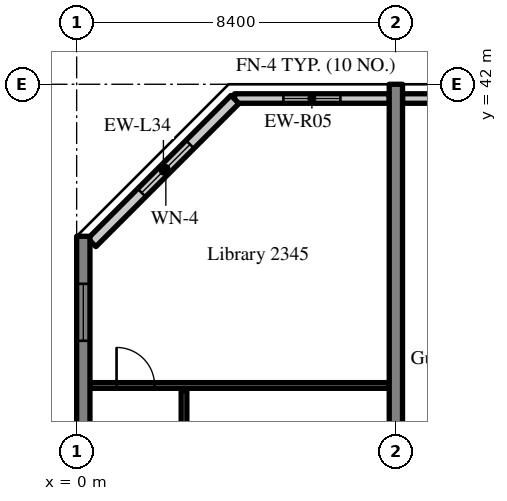
"""IFC4 building model, lengths in metres.
Left out: names, types, materials, properties, quantities, classifications, styles, units other than length and angle.
Written with IfcOpenShell. Run it as: python <this file> out.ifc"""

import sys

from ifc_helpers import new_model, si_unit, direction, frame, frame_2d, origin, place, context, subcontext, project, spatial, rectangle, extrude, source, transform, mapped, element, fill, save


model = new_model("IFC4")
c1 = context("Model", 3, precision=1e-05, world=origin(), true_north=direction((0.0, 1.0)))
c2 = subcontext(c1, "Body", "Model", "MODEL_VIEW")
j1 = project(units=[si_unit("LENGTHUNIT", "METRE"), si_unit("PLANEANGLEUNIT", "RADIAN")], contexts=[c1])
p1 = place(None, origin())
s1 = spatial("IfcSite", under=j1, at=p1, CompositionType="ELEMENT")
p2 = place(p1, origin())
s2 = spatial("IfcBuilding", under=s1, at=p2, CompositionType="ELEMENT")
p3 = place(p2, frame((0.0, 0.0, 99.0)))
s3 = spatial("IfcBuildingStorey", under=s2, at=p3, CompositionType="ELEMENT", Elevation=99.0)
m1 = source(origin(), c2, "Body", "SweptSolid", [
    extrude(rectangle(XDim=16.0, YDim=0.35, at=frame_2d((8.0, 0.0))), origin(), (0.0, 0.0, 1.0), 3.52),
])
p4 = place(p3, frame((0.175, 22.0, 0.0), z_axis=(0.0, 0.0, 1.0), x_axis=(0.0, 1.0, 0.0)))
e1 = element("IfcWall", 1, at=p4, inside=s3, PredefinedType="SHEAR", context=c2, shape_type="MappedRepresentation", body=[
    mapped(m1, transform((0.0, 0.0, 0.0), scale=1.0)),
])
m2 = source(origin(), c2, "Body", "SweptSolid", [
    extrude(rectangle(XDim=1.5, YDim=1.5, at=frame_2d((0.75, 0.75))), frame((0.0, 0.185, 0.0), z_axis=(0.0, -1.0, 0.0), x_axis=(1.0, 0.0, 0.0)), (0.0, 0.0, 1.0), 0.37),
])
p5 = place(p4, frame((1.25, 0.0, 0.9)))
e2 = element("IfcOpeningElement", 2, at=p5, cuts=e1, PredefinedType="OPENING", context=c2, shape_type="MappedRepresentation", body=[
    mapped(m2, transform((0.0, 0.0, 0.0), scale=1.0)),
])
p6 = place(p4, frame((5.25, 0.0, 0.9)))
e3 = element("IfcOpeningElement", 3, at=p6, cuts=e1, PredefinedType="OPENING", context=c2, shape_type="MappedRepresentation", body=[
    mapped(m2, transform((0.0, 0.0, 0.0), scale=1.0)),
])
p7 = place(p4, frame((9.25, 0.0, 0.9)))
e4 = element("IfcOpeningElement", 4, at=p7, cuts=e1, PredefinedType="OPENING", context=c2, shape_type="MappedRepresentation", body=[
    mapped(m2, transform((0.0, 0.0, 0.0), scale=1.0)),
])
p8 = place(p4, frame((13.25, 0.0, 0.9)))
e5 = element("IfcOpeningElement", 5, at=p8, cuts=e1, PredefinedType="OPENING", context=c2, shape_type="MappedRepresentation", body=[
    mapped(m2, transform((0.0, 0.0, 0.0), scale=1.0)),
])
m3 = source(origin(), c2, "Body", "SweptSolid", [
    extrude(rectangle(XDim=20.0, YDim=0.35, at=frame_2d((10.0, 0.0))), origin(), (0.0, 0.0, 1.0), 3.52),
])
p9 = place(p3, frame((8.4, 22.0, 0.0), z_axis=(0.0, 0.0, 1.0), x_axis=(0.0, 1.0, 0.0)))
e6 = element("IfcWall", 6, at=p9, inside=s3, PredefinedType="SHEAR", context=c2, shape_type="MappedRepresentation", body=[
    mapped(m3, transform((0.0, 0.0, 0.0), scale=1.0)),
])
m4 = source(origin(), c2, "Body", "SweptSolid", [
    extrude(rectangle(XDim=4.07, YDim=0.25, at=frame_2d((2.035, 0.0))), origin(), (0.0, 0.0, 1.0), 2.82),
])
p10 = place(p3, frame((8.225, 41.625, 0.0), z_axis=(0.0, 0.0, 1.0), x_axis=(-1.0, 0.0, 0.0)))
e7 = element("IfcWall", 7, at=p10, inside=s3, PredefinedType="SOLIDWALL", context=c2, shape_type="MappedRepresentation", body=[
    mapped(m4, transform((0.0, 0.0, 0.0), scale=1.0)),
])
m5 = source(origin(), c2, "Body", "SweptSolid", [
    extrude(rectangle(XDim=1.5, YDim=1.5, at=frame_2d((0.75, 0.75))), frame((0.0, 0.135, 0.0), z_axis=(0.0, -1.0, 0.0), x_axis=(1.0, 0.0, 0.0)), (0.0, 0.0, 1.0), 0.27),
])
p11 = place(p10, frame((1.285, 0.0, 0.9)))
e8 = element("IfcOpeningElement", 8, at=p11, cuts=e7, PredefinedType="OPENING", context=c2, shape_type="MappedRepresentation", body=[
    mapped(m5, transform((0.0, 0.0, 0.0), scale=1.0)),
])
m6 = source(origin(), c2, "Body", "SweptSolid", [
    extrude(rectangle(XDim=3.675, YDim=0.25, at=frame_2d((1.837, 0.0))), origin(), (0.0, 0.0, 1.0), 2.82),
])
p12 = place(p3, frame((12.25, 41.625, 0.0), z_axis=(0.0, 0.0, 1.0), x_axis=(-1.0, 0.0, 0.0)))
e9 = element("IfcWall", 9, at=p12, inside=s3, PredefinedType="SOLIDWALL", context=c2, shape_type="MappedRepresentation", body=[
    mapped(m6, transform((0.0, 0.0, 0.0), scale=1.0)),
])
p13 = place(p12, frame((1.087, 0.0, 0.9)))
e10 = element("IfcOpeningElement", 10, at=p13, cuts=e9, PredefinedType="OPENING", context=c2, shape_type="MappedRepresentation", body=[
    mapped(m5, transform((0.0, 0.0, 0.0), scale=1.0)),
])
m7 = source(origin(), c2, "Body", "SweptSolid", [
    extrude(rectangle(XDim=5.326, YDim=0.3, at=frame_2d((2.663, 0.0))), origin(), (0.0, 0.0, 1.0), 3.52),
])
p14 = place(p3, frame((4.166, 41.6, 0.0), z_axis=(0.0, 0.0, 1.0), x_axis=(-0.707106781187, -0.707106781187, 0.0)))
e11 = element("IfcWall", 11, at=p14, inside=s3, PredefinedType="SOLIDWALL", context=c2, shape_type="MappedRepresentation", body=[
    mapped(m7, transform((0.0, 0.0, 0.0), scale=1.0)),
])
m8 = source(origin(), c2, "Body", "SweptSolid", [
    extrude(rectangle(XDim=1.8, YDim=1.5, at=frame_2d((0.9, 0.75))), frame((0.0, 0.16, 0.0), z_axis=(0.0, -1.0, 0.0), x_axis=(1.0, 0.0, 0.0)), (0.0, 0.0, 1.0), 0.32),
])
p15 = place(p14, frame((1.672, 0.0, 0.9)))
e12 = element("IfcOpeningElement", 12, at=p15, cuts=e11, PredefinedType="OPENING", context=c2, shape_type="MappedRepresentation", body=[
    mapped(m8, transform((0.0, 0.0, 0.0), scale=1.0)),
])
m9 = source(origin(), c2, "Body", "SweptSolid", [
    extrude(rectangle(XDim=4.45, YDim=0.15, at=frame_2d((2.225, 0.0))), origin(), (0.0, 0.0, 1.0), 3.52),
])
p16 = place(p3, frame((2.825, 29.475, 0.0), z_axis=(0.0, 0.0, 1.0), x_axis=(0.0, 1.0, 0.0)))
e13 = element("IfcWall", 13, at=p16, inside=s3, PredefinedType="PARTITIONING", context=c2, shape_type="MappedRepresentation", body=[
    mapped(m9, transform((0.0, 0.0, 0.0), scale=1.0)),
])
m10 = source(origin(), c2, "Body", "SweptSolid", [
    extrude(rectangle(XDim=1.0, YDim=2.1, at=frame_2d((0.5, 1.05))), frame((0.0, 0.085, 0.0), z_axis=(0.0, -1.0, 0.0), x_axis=(1.0, 0.0, 0.0)), (0.0, 0.0, 1.0), 0.17),
])
p17 = place(p16, frame((1.725, 0.0, 0.0)))
e14 = element("IfcOpeningElement", 14, at=p17, cuts=e13, PredefinedType="OPENING", context=c2, shape_type="MappedRepresentation", body=[
    mapped(m10, transform((0.0, 0.0, 0.0), scale=1.0)),
])
m11 = source(origin(), c2, "Body", "SweptSolid", [
    extrude(rectangle(XDim=7.875, YDim=0.15, at=frame_2d((3.938, 0.0))), origin(), (0.0, 0.0, 1.0), 3.52),
])
p18 = place(p3, frame((0.35, 34.075, 0.0), z_axis=(0.0, 0.0, 1.0), x_axis=(1.0, 0.0, 0.0)))
e15 = element("IfcWall", 15, at=p18, inside=s3, PredefinedType="PARTITIONING", context=c2, shape_type="MappedRepresentation", body=[
    mapped(m11, transform((0.0, 0.0, 0.0), scale=1.0)),
])
p19 = place(p18, frame((0.7, 0.0, 0.0)))
e16 = element("IfcOpeningElement", 16, at=p19, cuts=e15, PredefinedType="OPENING", context=c2, shape_type="MappedRepresentation", body=[
    mapped(m10, transform((0.0, 0.0, 0.0), scale=1.0)),
])
m12 = source(origin(), c2, "Body", "SweptSolid", [
    extrude(rectangle(XDim=1.5, YDim=1.5, at=frame_2d((0.75, 0.75))), frame((0.0, 0.03, 0.0), z_axis=(0.0, -1.0, 0.0), x_axis=(1.0, 0.0, 0.0)), (0.0, 0.0, 1.0), 0.06),
])
p20 = place(p11, origin())
e17 = element("IfcWindow", 17, at=p20, inside=s3, PartitioningType="SINGLE_PANEL", PredefinedType="WINDOW", context=c2, shape_type="MappedRepresentation", body=[
    mapped(m12, transform((0.0, 0.0, 0.0), scale=1.0)),
])
fill(e8, e17)
m13 = source(origin(), c2, "Body", "SweptSolid", [
    extrude(rectangle(XDim=1.8, YDim=1.5, at=frame_2d((0.9, 0.75))), frame((0.0, 0.03, 0.0), z_axis=(0.0, -1.0, 0.0), x_axis=(1.0, 0.0, 0.0)), (0.0, 0.0, 1.0), 0.06),
])
p21 = place(p15, origin())
e18 = element("IfcWindow", 18, at=p21, inside=s3, PartitioningType="SINGLE_PANEL", PredefinedType="WINDOW", context=c2, shape_type="MappedRepresentation", body=[
    mapped(m13, transform((0.0, 0.0, 0.0), scale=1.0)),
])
fill(e12, e18)
p22 = place(p8, origin())
e19 = element("IfcWindow", 19, at=p22, inside=s3, PartitioningType="SINGLE_PANEL", PredefinedType="WINDOW", context=c2, shape_type="MappedRepresentation", body=[
    mapped(m12, transform((0.0, 0.0, 0.0), scale=1.0)),
])
fill(e5, e19)
m14 = source(origin(), c2, "Body", "SweptSolid", [
    extrude(rectangle(XDim=1.0, YDim=2.1, at=frame_2d((0.5, 1.05))), frame((0.0, 0.025, 0.0), z_axis=(0.0, -1.0, 0.0), x_axis=(1.0, 0.0, 0.0)), (0.0, 0.0, 1.0), 0.05),
])
p23 = place(p19, origin())
e20 = element("IfcDoor", 20, at=p23, inside=s3, OperationType="SINGLE_SWING_LEFT", PredefinedType="DOOR", context=c2, shape_type="MappedRepresentation", body=[
    mapped(m14, transform((0.0, 0.0, 0.0), scale=1.0)),
])
fill(e16, e20)
save(model, sys.argv[1])
